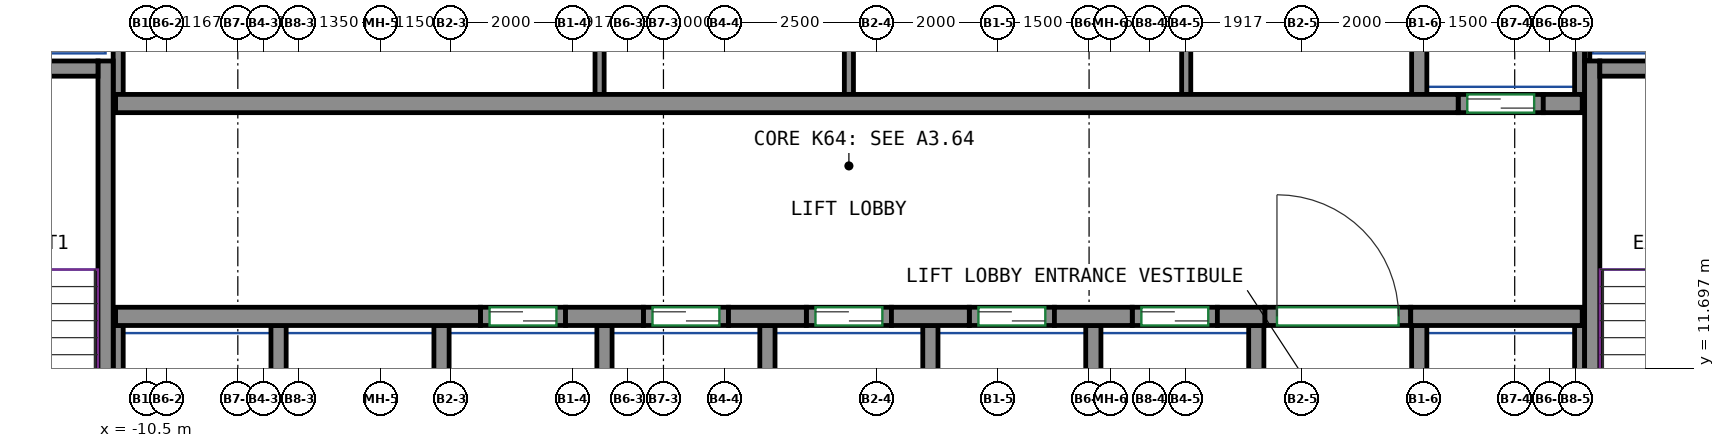
"""IFC4 building model, lengths in metres.
Left out: names, types, materials, properties, quantities, classifications, styles, units other than length and angle.
Written with IfcOpenShell. Run it as: python <this file> out.ifc"""

import sys

from ifc_helpers import new_model, si_unit, direction, frame, frame_2d, origin, place, context, subcontext, project, spatial, rectangle, extrude, source, transform, mapped, element, fill, save


model = new_model("IFC4")
c1 = context("Model", 3, precision=1e-05, world=origin(), true_north=direction((0.0, 1.0)))
c2 = subcontext(c1, "Body", "Model", "MODEL_VIEW")
j1 = project(units=[si_unit("LENGTHUNIT", "METRE"), si_unit("PLANEANGLEUNIT", "RADIAN")], contexts=[c1])
p1 = place(None, origin())
s1 = spatial("IfcSite", under=j1, at=p1, CompositionType="ELEMENT")
p2 = place(p1, origin())
s2 = spatial("IfcBuilding", under=s1, at=p2, CompositionType="ELEMENT")
p3 = place(p2, frame((0.0, 0.0, 259.4)))
s3 = spatial("IfcBuildingStorey", under=s2, at=p3, CompositionType="ELEMENT", Elevation=259.4)
m1 = source(origin(), c2, "Body", "SweptSolid", [
    extrude(rectangle(XDim=7.75, YDim=0.25, at=frame_2d((3.875, 0.0))), origin(), (0.0, 0.0, 1.0), 3.0),
])
p4 = place(p3, frame((-11.175, 9.0, 0.0), z_axis=(0.0, 0.0, 1.0), x_axis=(0.0, 1.0, 0.0)))
e1 = element("IfcWall", 1, at=p4, inside=s3, PredefinedType="SHEAR", context=c2, shape_type="MappedRepresentation", body=[
    mapped(m1, transform((0.0, 0.0, 0.0))),
])
m2 = source(origin(), c2, "Body", "SweptSolid", [
    extrude(rectangle(XDim=3.7, YDim=0.25, at=frame_2d((1.85, 0.0))), origin(), (0.0, 0.0, 1.0), 3.0),
])
p5 = place(p3, frame((-15.0, 16.625, 0.0), z_axis=(0.0, 0.0, 1.0), x_axis=(1.0, 0.0, 0.0)))
e2 = element("IfcWall", 2, at=p5, inside=s3, PredefinedType="SHEAR", context=c2, shape_type="MappedRepresentation", body=[
    mapped(m2, transform((0.0, 0.0, 0.0))),
])
p6 = place(p3, frame((13.275, 9.0, 0.0), z_axis=(0.0, 0.0, 1.0), x_axis=(0.0, 1.0, 0.0)))
e3 = element("IfcWall", 3, at=p6, inside=s3, PredefinedType="SHEAR", context=c2, shape_type="MappedRepresentation", body=[
    mapped(m1, transform((0.0, 0.0, 0.0))),
])
m3 = source(origin(), c2, "Body", "SweptSolid", [
    extrude(rectangle(XDim=3.7, YDim=0.25, at=frame_2d((1.85, 0.0))), origin(), (0.0, 0.0, 1.0), 3.0),
])
p7 = place(p3, frame((13.4, 16.625, 0.0), z_axis=(0.0, 0.0, 1.0), x_axis=(1.0, 0.0, 0.0)))
e4 = element("IfcWall", 4, at=p7, inside=s3, PredefinedType="SHEAR", context=c2, shape_type="MappedRepresentation", body=[
    mapped(m3, transform((0.0, 0.0, 0.0))),
])
m4 = source(origin(), c2, "Body", "SweptSolid", [
    extrude(rectangle(XDim=6.0, YDim=0.3, at=frame_2d((3.0, 0.0))), origin(), (0.0, 0.0, 1.0), 3.0),
])
p8 = place(p3, frame((-11.01, 12.55, 0.0), z_axis=(0.0, 0.0, 1.0), x_axis=(1.0, 0.0, 0.0)))
e5 = element("IfcWall", 5, at=p8, inside=s3, PredefinedType="SHEAR", context=c2, shape_type="MappedRepresentation", body=[
    mapped(m4, transform((0.0, 0.0, 0.0))),
])
m5 = source(origin(), c2, "Body", "SweptSolid", [
    extrude(rectangle(XDim=1.28, YDim=0.3, at=frame_2d((0.64, 0.0))), origin(), (0.0, 0.0, 1.0), 3.0),
])
for number, where, z_axis, x_axis in (
    (6, (-3.61, 12.55, 0.0), (0.0, 0.0, 1.0), (1.0, 0.0, 0.0)),
    (7, (-0.93, 12.55, 0.0), (0.0, 0.0, 1.0), (1.0, 0.0, 0.0)),
    (8, (1.75, 12.55, 0.0), (0.0, 0.0, 1.0), (1.0, 0.0, 0.0)),
    (9, (4.43, 12.55, 0.0), (0.0, 0.0, 1.0), (1.0, 0.0, 0.0)),
):
    element("IfcWall", number, at=place(p3, frame(where, z_axis=z_axis, x_axis=x_axis)), inside=s3, PredefinedType="SHEAR", context=c2, shape_type="MappedRepresentation", body=[
        mapped(m5, transform((0.0, 0.0, 0.0))),
    ])
m6 = source(origin(), c2, "Body", "SweptSolid", [
    extrude(rectangle(XDim=0.78, YDim=0.3, at=frame_2d((0.39, 0.0))), origin(), (0.0, 0.0, 1.0), 3.0),
])
p9 = place(p3, frame((7.11, 12.55, 0.0), z_axis=(0.0, 0.0, 1.0), x_axis=(1.0, 0.0, 0.0)))
e10 = element("IfcWall", 10, at=p9, inside=s3, PredefinedType="SHEAR", context=c2, shape_type="MappedRepresentation", body=[
    mapped(m6, transform((0.0, 0.0, 0.0))),
])
m7 = source(origin(), c2, "Body", "SweptSolid", [
    extrude(rectangle(XDim=2.82, YDim=0.3, at=frame_2d((1.41, 0.0))), origin(), (0.0, 0.0, 1.0), 3.0),
])
p10 = place(p3, frame((10.29, 12.55, 0.0), z_axis=(0.0, 0.0, 1.0), x_axis=(1.0, 0.0, 0.0)))
e11 = element("IfcWall", 11, at=p10, inside=s3, PredefinedType="SHEAR", context=c2, shape_type="MappedRepresentation", body=[
    mapped(m7, transform((0.0, 0.0, 0.0))),
])
m8 = source(origin(), c2, "Body", "SweptSolid", [
    extrude(rectangle(XDim=22.08, YDim=0.3, at=frame_2d((11.04, 0.0))), origin(), (0.0, 0.0, 1.0), 3.0),
])
p11 = place(p3, frame((-11.01, 16.05, 0.0), z_axis=(0.0, 0.0, 1.0), x_axis=(1.0, 0.0, 0.0)))
e12 = element("IfcWall", 12, at=p11, inside=s3, PredefinedType="SHEAR", context=c2, shape_type="MappedRepresentation", body=[
    mapped(m8, transform((0.0, 0.0, 0.0))),
])
m9 = source(origin(), c2, "Body", "SweptSolid", [
    extrude(rectangle(XDim=0.64, YDim=0.3, at=frame_2d((0.32, 0.0))), origin(), (0.0, 0.0, 1.0), 3.0),
])
p12 = place(p3, frame((12.47, 16.05, 0.0), z_axis=(0.0, 0.0, 1.0), x_axis=(1.0, 0.0, 0.0)))
e13 = element("IfcWall", 13, at=p12, inside=s3, PredefinedType="SHEAR", context=c2, shape_type="MappedRepresentation", body=[
    mapped(m9, transform((0.0, 0.0, 0.0))),
])
m10 = source(origin(), c2, "Body", "SweptSolid", [
    extrude(rectangle(XDim=1.4, YDim=0.3, at=frame_2d((0.7, 0.0))), origin(), (0.0, 0.0, 1.0), 3.0),
])
p13 = place(p3, frame((-5.01, 12.55, 0.0), z_axis=(0.0, 0.0, 1.0), x_axis=(1.0, 0.0, 0.0)))
e14 = element("IfcWall", 14, at=p13, inside=s3, PredefinedType="PARTITIONING", context=c2, shape_type="MappedRepresentation", body=[
    mapped(m10, transform((0.0, 0.0, 0.0))),
])
p14 = place(p13, frame((0.15, 0.0, 0.0)))
e15 = element("IfcOpeningElement", 15, at=p14, cuts=e14, PredefinedType="OPENING", context=c2, shape_type="SweptSolid", body=[
    extrude(rectangle(XDim=1.1, YDim=2.1, at=frame_2d((0.55, 1.05))), frame((0.0, 0.16, 0.0), z_axis=(0.0, -1.0, 0.0), x_axis=(1.0, 0.0, 0.0)), (0.0, 0.0, 1.0), 0.32),
])
m11 = source(origin(), c2, "Body", "SweptSolid", [
    extrude(rectangle(XDim=1.4, YDim=0.3, at=frame_2d((0.7, 0.0))), origin(), (0.0, 0.0, 1.0), 3.0),
])
p15 = place(p3, frame((-2.33, 12.55, 0.0), z_axis=(0.0, 0.0, 1.0), x_axis=(1.0, 0.0, 0.0)))
e16 = element("IfcWall", 16, at=p15, inside=s3, PredefinedType="PARTITIONING", context=c2, shape_type="MappedRepresentation", body=[
    mapped(m11, transform((0.0, 0.0, 0.0))),
])
p16 = place(p15, frame((0.15, 0.0, 0.0)))
e17 = element("IfcOpeningElement", 17, at=p16, cuts=e16, PredefinedType="OPENING", context=c2, shape_type="SweptSolid", body=[
    extrude(rectangle(XDim=1.1, YDim=2.1, at=frame_2d((0.55, 1.05))), frame((0.0, 0.16, 0.0), z_axis=(0.0, -1.0, 0.0), x_axis=(1.0, 0.0, 0.0)), (0.0, 0.0, 1.0), 0.32),
])
p17 = place(p3, frame((0.35, 12.55, 0.0), z_axis=(0.0, 0.0, 1.0), x_axis=(1.0, 0.0, 0.0)))
e18 = element("IfcWall", 18, at=p17, inside=s3, PredefinedType="PARTITIONING", context=c2, shape_type="MappedRepresentation", body=[
    mapped(m10, transform((0.0, 0.0, 0.0))),
])
p18 = place(p17, frame((0.15, 0.0, 0.0)))
e19 = element("IfcOpeningElement", 19, at=p18, cuts=e18, PredefinedType="OPENING", context=c2, shape_type="SweptSolid", body=[
    extrude(rectangle(XDim=1.1, YDim=2.1, at=frame_2d((0.55, 1.05))), frame((0.0, 0.16, 0.0), z_axis=(0.0, -1.0, 0.0), x_axis=(1.0, 0.0, 0.0)), (0.0, 0.0, 1.0), 0.32),
])
p19 = place(p3, frame((3.03, 12.55, 0.0), z_axis=(0.0, 0.0, 1.0), x_axis=(1.0, 0.0, 0.0)))
e20 = element("IfcWall", 20, at=p19, inside=s3, PredefinedType="PARTITIONING", context=c2, shape_type="MappedRepresentation", body=[
    mapped(m10, transform((0.0, 0.0, 0.0))),
])
p20 = place(p19, frame((0.15, 0.0, 0.0)))
e21 = element("IfcOpeningElement", 21, at=p20, cuts=e20, PredefinedType="OPENING", context=c2, shape_type="SweptSolid", body=[
    extrude(rectangle(XDim=1.1, YDim=2.1, at=frame_2d((0.55, 1.05))), frame((0.0, 0.16, 0.0), z_axis=(0.0, -1.0, 0.0), x_axis=(1.0, 0.0, 0.0)), (0.0, 0.0, 1.0), 0.32),
])
p21 = place(p3, frame((5.71, 12.55, 0.0), z_axis=(0.0, 0.0, 1.0), x_axis=(1.0, 0.0, 0.0)))
e22 = element("IfcWall", 22, at=p21, inside=s3, PredefinedType="PARTITIONING", context=c2, shape_type="MappedRepresentation", body=[
    mapped(m11, transform((0.0, 0.0, 0.0))),
])
p22 = place(p21, frame((0.15, 0.0, 0.0)))
e23 = element("IfcOpeningElement", 23, at=p22, cuts=e22, PredefinedType="OPENING", context=c2, shape_type="SweptSolid", body=[
    extrude(rectangle(XDim=1.1, YDim=2.1, at=frame_2d((0.55, 1.05))), frame((0.0, 0.16, 0.0), z_axis=(0.0, -1.0, 0.0), x_axis=(1.0, 0.0, 0.0)), (0.0, 0.0, 1.0), 0.32),
])
p23 = place(p3, frame((11.07, 16.05, 0.0), z_axis=(0.0, 0.0, 1.0), x_axis=(1.0, 0.0, 0.0)))
e24 = element("IfcWall", 24, at=p23, inside=s3, PredefinedType="PARTITIONING", context=c2, shape_type="MappedRepresentation", body=[
    mapped(m10, transform((0.0, 0.0, 0.0))),
])
p24 = place(p23, frame((0.15, 0.0, 0.0)))
e25 = element("IfcOpeningElement", 25, at=p24, cuts=e24, PredefinedType="OPENING", context=c2, shape_type="SweptSolid", body=[
    extrude(rectangle(XDim=1.1, YDim=2.1, at=frame_2d((0.55, 1.05))), frame((0.0, 0.16, 0.0), z_axis=(0.0, -1.0, 0.0), x_axis=(1.0, 0.0, 0.0)), (0.0, 0.0, 1.0), 0.32),
])
m12 = source(origin(), c2, "Body", "SweptSolid", [
    extrude(rectangle(XDim=2.4, YDim=0.3, at=frame_2d((1.2, 0.0))), origin(), (0.0, 0.0, 1.0), 3.0),
])
p25 = place(p3, frame((7.89, 12.55, 0.0), z_axis=(0.0, 0.0, 1.0), x_axis=(1.0, 0.0, 0.0)))
e26 = element("IfcWall", 26, at=p25, inside=s3, PredefinedType="PARTITIONING", context=c2, shape_type="MappedRepresentation", body=[
    mapped(m12, transform((0.0, 0.0, 0.0))),
])
p26 = place(p25, frame((0.2, 0.0, 0.0)))
e27 = element("IfcOpeningElement", 27, at=p26, cuts=e26, PredefinedType="OPENING", context=c2, shape_type="SweptSolid", body=[
    extrude(rectangle(XDim=2.0, YDim=2.1, at=frame_2d((1.0, 1.05))), frame((0.0, 0.16, 0.0), z_axis=(0.0, -1.0, 0.0), x_axis=(1.0, 0.0, 0.0)), (0.0, 0.0, 1.0), 0.32),
])
m13 = source(origin(), c2, "Body", "SweptSolid", [
    extrude(rectangle(XDim=3.275, YDim=0.165, at=frame_2d((1.638, 0.0))), origin(), (0.0, 0.0, 1.0), 3.0),
])
p27 = place(p3, frame((13.067, 16.2, 0.0), z_axis=(0.0, 0.0, 1.0), x_axis=(0.0, 1.0, 0.0)))
e28 = element("IfcWall", 28, at=p27, inside=s3, PredefinedType="PARTITIONING", context=c2, shape_type="MappedRepresentation", body=[
    mapped(m13, transform((0.0, 0.0, 0.0))),
])
m14 = source(origin(), c2, "Body", "SweptSolid", [
    extrude(rectangle(XDim=4.8, YDim=0.165, at=frame_2d((2.4, 0.0))), origin(), (0.0, 0.0, 1.0), 3.0),
])
p28 = place(p3, frame((-10.968, 16.2, 0.0), z_axis=(0.0, 0.0, 1.0), x_axis=(0.0, 1.0, 0.0)))
e29 = element("IfcWall", 29, at=p28, inside=s3, PredefinedType="PARTITIONING", context=c2, shape_type="MappedRepresentation", body=[
    mapped(m14, transform((0.0, 0.0, 0.0))),
])
m15 = source(origin(), c2, "Body", "SweptSolid", [
    extrude(rectangle(XDim=3.275, YDim=0.25, at=frame_2d((1.638, 0.0))), origin(), (0.0, 0.0, 1.0), 3.0),
])
p29 = place(p3, frame((10.43, 16.2, 0.0), z_axis=(0.0, 0.0, 1.0), x_axis=(0.0, 1.0, 0.0)))
e30 = element("IfcWall", 30, at=p29, inside=s3, PredefinedType="PARTITIONING", context=c2, shape_type="MappedRepresentation", body=[
    mapped(m15, transform((0.0, 0.0, 0.0))),
])
m16 = source(origin(), c2, "Body", "SweptSolid", [
    extrude(rectangle(XDim=2.725, YDim=0.085, at=frame_2d((1.363, 0.0))), origin(), (0.0, 0.0, 1.0), 3.0),
])
p30 = place(p3, frame((13.192, 16.75, 0.0), z_axis=(0.0, 0.0, 1.0), x_axis=(0.0, 1.0, 0.0)))
e31 = element("IfcWall", 31, at=p30, inside=s3, PredefinedType="PARTITIONING", context=c2, shape_type="MappedRepresentation", body=[
    mapped(m16, transform((0.0, 0.0, 0.0))),
])
m17 = source(origin(), c2, "Body", "SweptSolid", [
    extrude(rectangle(XDim=3.4, YDim=0.25, at=frame_2d((1.7, 0.0))), origin(), (0.0, 0.0, 1.0), 3.0),
])
p31 = place(p3, frame((10.43, 9.0, 0.0), z_axis=(0.0, 0.0, 1.0), x_axis=(0.0, 1.0, 0.0)))
e32 = element("IfcWall", 32, at=p31, inside=s3, PredefinedType="PARTITIONING", context=c2, shape_type="MappedRepresentation", body=[
    mapped(m17, transform((0.0, 0.0, 0.0))),
])
m18 = source(origin(), c2, "Body", "SweptSolid", [
    extrude(rectangle(XDim=3.4, YDim=0.165, at=frame_2d((1.7, 0.0))), origin(), (0.0, 0.0, 1.0), 3.0),
])
p32 = place(p3, frame((13.067, 9.0, 0.0), z_axis=(0.0, 0.0, 1.0), x_axis=(0.0, 1.0, 0.0)))
e33 = element("IfcWall", 33, at=p32, inside=s3, PredefinedType="PARTITIONING", context=c2, shape_type="MappedRepresentation", body=[
    mapped(m18, transform((0.0, 0.0, 0.0))),
])
for number, where, z_axis, x_axis in (
    (34, (2.39, 9.0, 0.0), (0.0, 0.0, 1.0), (0.0, 1.0, 0.0)),
    (35, (5.07, 9.0, 0.0), (0.0, 0.0, 1.0), (0.0, 1.0, 0.0)),
    (36, (7.75, 9.0, 0.0), (0.0, 0.0, 1.0), (0.0, 1.0, 0.0)),
    (37, (-0.29, 9.0, 0.0), (0.0, 0.0, 1.0), (0.0, 1.0, 0.0)),
):
    element("IfcWall", number, at=place(p3, frame(where, z_axis=z_axis, x_axis=x_axis)), inside=s3, PredefinedType="PARTITIONING", context=c2, shape_type="MappedRepresentation", body=[
        mapped(m17, transform((0.0, 0.0, 0.0))),
    ])
p33 = place(p3, frame((-10.968, 9.0, 0.0), z_axis=(0.0, 0.0, 1.0), x_axis=(0.0, 1.0, 0.0)))
e38 = element("IfcWall", 38, at=p33, inside=s3, PredefinedType="PARTITIONING", context=c2, shape_type="MappedRepresentation", body=[
    mapped(m18, transform((0.0, 0.0, 0.0))),
])
for number, where, z_axis, x_axis in (
    (39, (-2.97, 9.0, 0.0), (0.0, 0.0, 1.0), (0.0, 1.0, 0.0)),
    (40, (-5.65, 9.0, 0.0), (0.0, 0.0, 1.0), (0.0, 1.0, 0.0)),
    (41, (-8.33, 9.0, 0.0), (0.0, 0.0, 1.0), (0.0, 1.0, 0.0)),
):
    element("IfcWall", number, at=place(p3, frame(where, z_axis=z_axis, x_axis=x_axis)), inside=s3, PredefinedType="PARTITIONING", context=c2, shape_type="MappedRepresentation", body=[
        mapped(m17, transform((0.0, 0.0, 0.0))),
    ])
m19 = source(origin(), c2, "Body", "SweptSolid", [
    extrude(rectangle(XDim=4.8, YDim=0.15, at=frame_2d((2.4, 0.0))), origin(), (0.0, 0.0, 1.0), 3.0),
])
for number, where, z_axis, x_axis in (
    (42, (-3.05, 16.2, 0.0), (0.0, 0.0, 1.0), (0.0, 1.0, 0.0)),
    (43, (1.05, 16.2, 0.0), (0.0, 0.0, 1.0), (0.0, 1.0, 0.0)),
    (44, (6.598, 16.2, 0.0), (0.0, 0.0, 1.0), (0.0, 1.0, 0.0)),
):
    element("IfcWall", number, at=place(p3, frame(where, z_axis=z_axis, x_axis=x_axis)), inside=s3, PredefinedType="PARTITIONING", context=c2, shape_type="MappedRepresentation", body=[
        mapped(m19, transform((0.0, 0.0, 0.0))),
    ])
p34 = place(p26, origin())
e45 = element("IfcDoor", 45, at=p34, inside=s3, OperationType="DOUBLE_DOOR_SINGLE_SWING", PredefinedType="DOOR", context=c2, shape_type="SweptSolid", body=[
    extrude(rectangle(XDim=2.0, YDim=2.1, at=frame_2d((1.0, 1.05))), frame((0.0, 0.025, 0.0), z_axis=(0.0, -1.0, 0.0), x_axis=(1.0, 0.0, 0.0)), (0.0, 0.0, 1.0), 0.05),
])
fill(e27, e45)
p35 = place(p14, origin())
e46 = element("IfcDoor", 46, at=p35, inside=s3, OperationType="DOUBLE_DOOR_SLIDING", PredefinedType="DOOR", context=c2, shape_type="SweptSolid", body=[
    extrude(rectangle(XDim=1.1, YDim=2.1, at=frame_2d((0.55, 1.05))), frame((0.0, 0.025, 0.0), z_axis=(0.0, -1.0, 0.0), x_axis=(1.0, 0.0, 0.0)), (0.0, 0.0, 1.0), 0.05),
])
fill(e15, e46)
p36 = place(p16, origin())
e47 = element("IfcDoor", 47, at=p36, inside=s3, OperationType="DOUBLE_DOOR_SLIDING", PredefinedType="DOOR", context=c2, shape_type="SweptSolid", body=[
    extrude(rectangle(XDim=1.1, YDim=2.1, at=frame_2d((0.55, 1.05))), frame((0.0, 0.025, 0.0), z_axis=(0.0, -1.0, 0.0), x_axis=(1.0, 0.0, 0.0)), (0.0, 0.0, 1.0), 0.05),
])
fill(e17, e47)
p37 = place(p18, origin())
e48 = element("IfcDoor", 48, at=p37, inside=s3, OperationType="DOUBLE_DOOR_SLIDING", PredefinedType="DOOR", context=c2, shape_type="SweptSolid", body=[
    extrude(rectangle(XDim=1.1, YDim=2.1, at=frame_2d((0.55, 1.05))), frame((0.0, 0.025, 0.0), z_axis=(0.0, -1.0, 0.0), x_axis=(1.0, 0.0, 0.0)), (0.0, 0.0, 1.0), 0.05),
])
fill(e19, e48)
p38 = place(p20, origin())
e49 = element("IfcDoor", 49, at=p38, inside=s3, OperationType="DOUBLE_DOOR_SLIDING", PredefinedType="DOOR", context=c2, shape_type="SweptSolid", body=[
    extrude(rectangle(XDim=1.1, YDim=2.1, at=frame_2d((0.55, 1.05))), frame((0.0, 0.025, 0.0), z_axis=(0.0, -1.0, 0.0), x_axis=(1.0, 0.0, 0.0)), (0.0, 0.0, 1.0), 0.05),
])
fill(e21, e49)
p39 = place(p22, origin())
e50 = element("IfcDoor", 50, at=p39, inside=s3, OperationType="DOUBLE_DOOR_SLIDING", PredefinedType="DOOR", context=c2, shape_type="SweptSolid", body=[
    extrude(rectangle(XDim=1.1, YDim=2.1, at=frame_2d((0.55, 1.05))), frame((0.0, 0.025, 0.0), z_axis=(0.0, -1.0, 0.0), x_axis=(1.0, 0.0, 0.0)), (0.0, 0.0, 1.0), 0.05),
])
fill(e23, e50)
p40 = place(p24, origin())
e51 = element("IfcDoor", 51, at=p40, inside=s3, OperationType="DOUBLE_DOOR_SLIDING", PredefinedType="DOOR", context=c2, shape_type="SweptSolid", body=[
    extrude(rectangle(XDim=1.1, YDim=2.1, at=frame_2d((0.55, 1.05))), frame((0.0, 0.025, 0.0), z_axis=(0.0, -1.0, 0.0), x_axis=(1.0, 0.0, 0.0)), (0.0, 0.0, 1.0), 0.05),
])
fill(e25, e51)
save(model, sys.argv[1])
